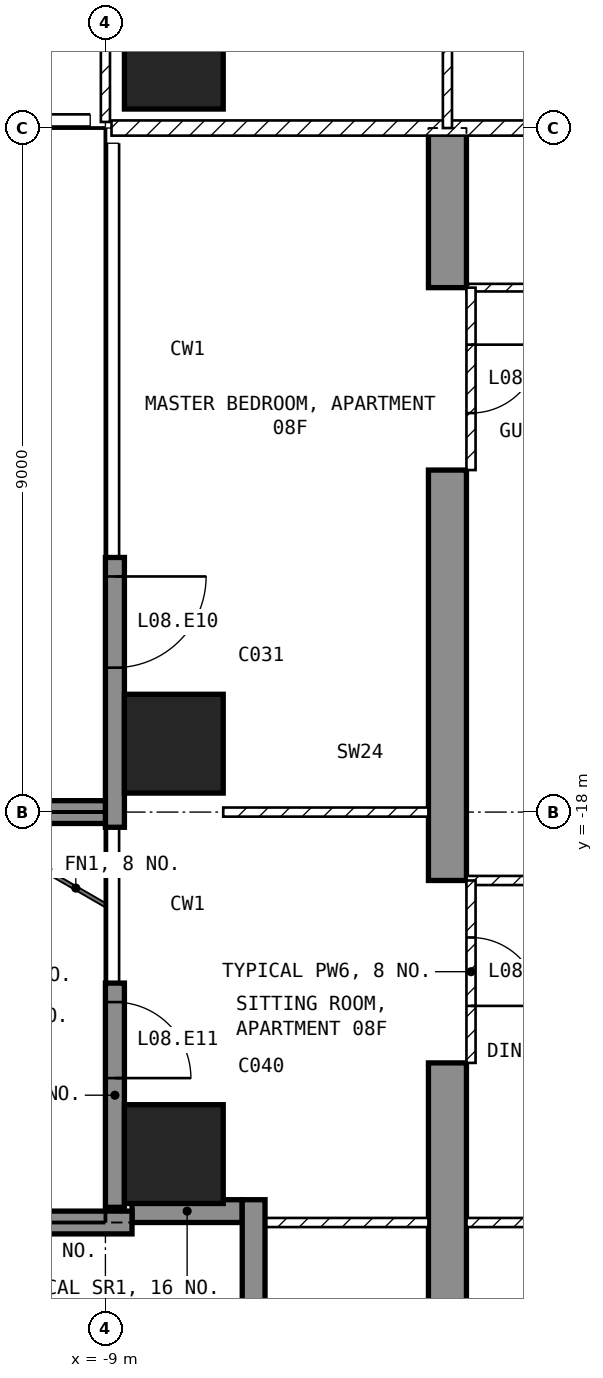
"""IFC4 building model, lengths in metres.
Left out: names, types, materials, properties, quantities, classifications, styles, units other than length and angle.
Written with IfcOpenShell. Run it as: python <this file> out.ifc"""

import sys

from ifc_helpers import new_model, si_unit, direction, frame, frame_2d, origin, origin_2d, place, context, subcontext, project, spatial, polyline, rectangle, outline, extrude, element, fill, save


model = new_model("IFC4")
c1 = context("Model", 3, precision=1e-05, world=origin(), true_north=direction((0.0, 1.0)))
c2 = subcontext(c1, "Body", "Model", "MODEL_VIEW")
j1 = project(units=[si_unit("LENGTHUNIT", "METRE"), si_unit("PLANEANGLEUNIT", "RADIAN")], contexts=[c1])
p1 = place(None, origin())
s1 = spatial("IfcSite", under=j1, at=p1, CompositionType="ELEMENT")
p2 = place(p1, origin())
s2 = spatial("IfcBuilding", under=s1, at=p2, CompositionType="ELEMENT")
p3 = place(p2, frame((0.0, 0.0, 47.0)))
s3 = spatial("IfcBuildingStorey", under=s2, at=p3, CompositionType="ELEMENT", Elevation=47.0)
for number, where, z_axis, x_axis in (
    (1, (-8.1, -22.5, -0.25), (0.0, 0.0, 1.0), (1.0, 0.0, 0.0)),
    (2, (-8.1, -17.1, -0.25), (0.0, 0.0, 1.0), (1.0, 0.0, 0.0)),
    (3, (-8.1, -8.1, -0.25), (0.0, 0.0, 1.0), (1.0, 0.0, 0.0)),
):
    element("IfcColumn", number, at=place(p3, frame(where, z_axis=z_axis, x_axis=x_axis)), inside=s3, PredefinedType="COLUMN", context=c2, shape_type="SweptSolid", body=[
        extrude(rectangle(XDim=1.3, YDim=1.3, at=origin_2d()), origin(), (0.0, 0.0, 1.0), 3.5),
    ])
p4 = place(p3, frame((-4.75, -25.45, -0.25), z_axis=(1.0, 0.0, 0.0), x_axis=(0.0, 1.0, 0.0)))
e4 = element("IfcWall", 4, at=p4, inside=s3, PredefinedType="SHEAR", context=c2, shape_type="SweptSolid", body=[
    extrude(outline(polyline([(0.0, 0.0), (4.15, 0.0), (4.15, 2.65), (6.55, 2.65), (6.55, 0.0), (11.95, 0.0), (11.95, 2.65), (14.35, 2.65), (14.35, 0.0), (16.45, 0.0), (16.45, 3.5), (0.0, 3.5), (0.0, 0.0)])), origin(), (0.0, 0.0, 1.0), 0.5),
])
p5 = place(p3, frame((-8.875, -14.65, 0.0), z_axis=(0.0, 0.0, 1.0), x_axis=(0.0, -1.0, 0.0)))
e5 = element("IfcWall", 5, at=p5, inside=s3, PredefinedType="SOLIDWALL", context=c2, shape_type="SweptSolid", body=[
    extrude(rectangle(XDim=3.55, YDim=0.25, at=frame_2d((1.775, 0.0))), origin(), (0.0, 0.0, 1.0), 3.25),
])
p6 = place(p5, frame((0.25, 0.0, 0.0)))
e6 = element("IfcOpeningElement", 6, at=p6, cuts=e5, PredefinedType="OPENING", context=c2, shape_type="SweptSolid", body=[
    extrude(rectangle(XDim=1.2, YDim=2.4, at=frame_2d((0.6, 1.2))), frame((0.0, 0.135, 0.0), z_axis=(0.0, -1.0, 0.0), x_axis=(1.0, 0.0, 0.0)), (0.0, 0.0, 1.0), 0.27),
])
p7 = place(p3, frame((-8.875, -20.25, 0.0), z_axis=(0.0, 0.0, 1.0), x_axis=(0.0, -1.0, 0.0)))
e7 = element("IfcWall", 7, at=p7, inside=s3, PredefinedType="SOLIDWALL", context=c2, shape_type="SweptSolid", body=[
    extrude(rectangle(XDim=2.95, YDim=0.25, at=frame_2d((1.475, 0.0))), origin(), (0.0, 0.0, 1.0), 3.25),
])
p8 = place(p7, frame((0.25, 0.0, 0.0)))
e8 = element("IfcOpeningElement", 8, at=p8, cuts=e7, PredefinedType="OPENING", context=c2, shape_type="SweptSolid", body=[
    extrude(rectangle(XDim=1.0, YDim=2.4, at=frame_2d((0.5, 1.2))), frame((0.0, 0.135, 0.0), z_axis=(0.0, -1.0, 0.0), x_axis=(1.0, 0.0, 0.0)), (0.0, 0.0, 1.0), 0.27),
])
p9 = place(p3, frame((-8.65, -23.25, 0.0), z_axis=(0.0, 0.0, 1.0), x_axis=(1.0, 0.0, 0.0)))
e9 = element("IfcWall", 9, at=p9, inside=s3, PredefinedType="SOLIDWALL", context=c2, shape_type="SweptSolid", body=[
    extrude(rectangle(XDim=1.45, YDim=0.3, at=frame_2d((0.725, 0.0))), origin(), (0.0, 0.0, 1.0), 3.25),
])
p10 = place(p3, frame((-7.05, -23.1, 0.0), z_axis=(0.0, 0.0, 1.0), x_axis=(0.0, -1.0, 0.0)))
e10 = element("IfcWall", 10, at=p10, inside=s3, PredefinedType="SOLIDWALL", context=c2, shape_type="SweptSolid", body=[
    extrude(rectangle(XDim=1.8, YDim=0.3, at=frame_2d((0.9, 0.0))), origin(), (0.0, 0.0, 1.0), 3.25),
])
p11 = place(p3, frame((-8.65, -23.4, 0.0), z_axis=(0.0, 0.0, 1.0), x_axis=(-1.0, 0.0, 0.0)))
e11 = element("IfcWall", 11, at=p11, inside=s3, PredefinedType="SOLIDWALL", context=c2, shape_type="SweptSolid", body=[
    extrude(rectangle(XDim=3.05, YDim=0.3, at=frame_2d((1.525, 0.0))), origin(), (0.0, 0.0, 1.0), 3.25),
])
p12 = place(p3, frame((-9.0, -18.0, 0.0), z_axis=(0.0, 0.0, 1.0), x_axis=(-1.0, 0.0, 0.0)))
e12 = element("IfcWall", 12, at=p12, inside=s3, PredefinedType="SOLIDWALL", context=c2, shape_type="SweptSolid", body=[
    extrude(rectangle(XDim=2.7, YDim=0.3, at=frame_2d((1.35, 0.0))), origin(), (0.0, 0.0, 1.0), 3.25),
])
p13 = place(p3, frame((8.92, -9.0, 0.0), z_axis=(0.0, 0.0, 1.0), x_axis=(-1.0, 0.0, 0.0)))
e13 = element("IfcWall", 13, at=p13, inside=s3, PredefinedType="PARTITIONING", context=c2, shape_type="SweptSolid", body=[
    extrude(rectangle(XDim=17.84, YDim=0.2, at=frame_2d((8.92, 0.0))), origin(), (0.0, 0.0, 1.0), 3.25),
])
p14 = place(p13, frame((8.42, 0.0, 0.0)))
e14 = element("IfcOpeningElement", 14, at=p14, cuts=e13, PredefinedType="OPENING", context=c2, shape_type="SweptSolid", body=[
    extrude(rectangle(XDim=1.0, YDim=2.1, at=frame_2d((0.5, 1.05))), frame((0.0, 0.11, 0.0), z_axis=(0.0, -1.0, 0.0), x_axis=(1.0, 0.0, 0.0)), (0.0, 0.0, 1.0), 0.22),
])
p15 = place(p3, frame((-9.0, -4.56, 0.0), z_axis=(0.0, 0.0, 1.0), x_axis=(0.0, -1.0, 0.0)))
e15 = element("IfcWall", 15, at=p15, inside=s3, PredefinedType="PARTITIONING", context=c2, shape_type="SweptSolid", body=[
    extrude(rectangle(XDim=4.36, YDim=0.12, at=frame_2d((2.18, 0.0))), origin(), (0.0, 0.0, 1.0), 3.25),
])
p16 = place(p15, frame((0.77, 0.0, 0.0)))
e16 = element("IfcOpeningElement", 16, at=p16, cuts=e15, PredefinedType="OPENING", context=c2, shape_type="SweptSolid", body=[
    extrude(rectangle(XDim=0.9, YDim=2.1, at=frame_2d((0.45, 1.05))), frame((0.0, 0.07, 0.0), z_axis=(0.0, -1.0, 0.0), x_axis=(1.0, 0.0, 0.0)), (0.0, 0.0, 1.0), 0.14),
])
p17 = place(p3, frame((-4.5, -1.3, 0.0), z_axis=(0.0, 0.0, 1.0), x_axis=(0.0, -1.0, 0.0)))
e17 = element("IfcWall", 17, at=p17, inside=s3, PredefinedType="PARTITIONING", context=c2, shape_type="SweptSolid", body=[
    extrude(rectangle(XDim=7.7, YDim=0.12, at=frame_2d((3.85, 0.0))), origin(), (0.0, 0.0, 1.0), 3.25),
])
p18 = place(p17, frame((4.988, 0.0, 0.0)))
e18 = element("IfcOpeningElement", 18, at=p18, cuts=e17, PredefinedType="OPENING", context=c2, shape_type="SweptSolid", body=[
    extrude(rectangle(XDim=0.9, YDim=2.1, at=frame_2d((0.45, 1.05))), frame((0.0, 0.07, 0.0), z_axis=(0.0, -1.0, 0.0), x_axis=(1.0, 0.0, 0.0)), (0.0, 0.0, 1.0), 0.14),
])
p19 = place(p3, frame((-2.1, -11.1, 0.0), z_axis=(0.0, 0.0, 1.0), x_axis=(-1.0, 0.0, 0.0)))
e19 = element("IfcWall", 19, at=p19, inside=s3, PredefinedType="PARTITIONING", context=c2, shape_type="SweptSolid", body=[
    extrude(rectangle(XDim=2.15, YDim=0.1, at=frame_2d((1.075, 0.0))), origin(), (0.0, 0.0, 1.0), 3.25),
])
p20 = place(p3, frame((4.25, -18.9, 0.0), z_axis=(0.0, 0.0, 1.0), x_axis=(-1.0, 0.0, 0.0)))
e20 = element("IfcWall", 20, at=p20, inside=s3, PredefinedType="PARTITIONING", context=c2, shape_type="SweptSolid", body=[
    extrude(rectangle(XDim=8.5, YDim=0.12, at=frame_2d((4.25, 0.0))), origin(), (0.0, 0.0, 1.0), 3.25),
])
p21 = place(p20, frame((5.675, 0.0, 0.0)))
e21 = element("IfcOpeningElement", 21, at=p21, cuts=e20, PredefinedType="OPENING", context=c2, shape_type="SweptSolid", body=[
    extrude(rectangle(XDim=0.9, YDim=2.1, at=frame_2d((0.45, 1.05))), frame((0.0, 0.07, 0.0), z_axis=(0.0, -1.0, 0.0), x_axis=(1.0, 0.0, 0.0)), (0.0, 0.0, 1.0), 0.14),
])
p22 = place(p3, frame((4.25, -23.4, 0.0), z_axis=(0.0, 0.0, 1.0), x_axis=(-1.0, 0.0, 0.0)))
e22 = element("IfcWall", 22, at=p22, inside=s3, PredefinedType="PARTITIONING", context=c2, shape_type="SweptSolid", body=[
    extrude(rectangle(XDim=8.5, YDim=0.12, at=frame_2d((4.25, 0.0))), origin(), (0.0, 0.0, 1.0), 3.25),
])
p23 = place(p22, frame((5.675, 0.0, 0.0)))
e23 = element("IfcOpeningElement", 23, at=p23, cuts=e22, PredefinedType="OPENING", context=c2, shape_type="SweptSolid", body=[
    extrude(rectangle(XDim=0.9, YDim=2.1, at=frame_2d((0.45, 1.05))), frame((0.0, 0.07, 0.0), z_axis=(0.0, -1.0, 0.0), x_axis=(1.0, 0.0, 0.0)), (0.0, 0.0, 1.0), 0.14),
])
p24 = place(p3, frame((-4.75, -18.0, 0.0), z_axis=(0.0, 0.0, 1.0), x_axis=(-1.0, 0.0, 0.0)))
e24 = element("IfcWall", 24, at=p24, inside=s3, PredefinedType="PARTITIONING", context=c2, shape_type="SweptSolid", body=[
    extrude(rectangle(XDim=2.7, YDim=0.12, at=frame_2d((1.35, 0.0))), origin(), (0.0, 0.0, 1.0), 3.25),
])
p25 = place(p3, frame((-4.75, -23.4, 0.0), z_axis=(0.0, 0.0, 1.0), x_axis=(-1.0, 0.0, 0.0)))
e25 = element("IfcWall", 25, at=p25, inside=s3, PredefinedType="PARTITIONING", context=c2, shape_type="SweptSolid", body=[
    extrude(rectangle(XDim=2.37, YDim=0.12, at=frame_2d((1.185, 0.0))), origin(), (0.0, 0.0, 1.0), 3.25),
])
p26 = place(p3, frame((-4.19, -11.1, 0.0), z_axis=(0.0, 0.0, 1.0), x_axis=(0.0, -1.0, 0.0)))
e26 = element("IfcWall", 26, at=p26, inside=s3, PredefinedType="PARTITIONING", context=c2, shape_type="SweptSolid", body=[
    extrude(rectangle(XDim=2.4, YDim=0.12, at=frame_2d((1.2, 0.0))), origin(), (0.0, 0.0, 1.0), 2.4),
])
p27 = place(p26, frame((0.75, 0.0, 0.0)))
e27 = element("IfcOpeningElement", 27, at=p27, cuts=e26, PredefinedType="OPENING", context=c2, shape_type="SweptSolid", body=[
    extrude(rectangle(XDim=0.9, YDim=2.1, at=frame_2d((0.45, 1.05))), frame((0.0, 0.07, 0.0), z_axis=(0.0, -1.0, 0.0), x_axis=(1.0, 0.0, 0.0)), (0.0, 0.0, 1.0), 0.14),
])
p28 = place(p3, frame((-4.19, -18.9, 0.0), z_axis=(0.0, 0.0, 1.0), x_axis=(0.0, -1.0, 0.0)))
e28 = element("IfcWall", 28, at=p28, inside=s3, PredefinedType="PARTITIONING", context=c2, shape_type="SweptSolid", body=[
    extrude(rectangle(XDim=2.4, YDim=0.12, at=frame_2d((1.2, 0.0))), origin(), (0.0, 0.0, 1.0), 2.4),
])
p29 = place(p28, frame((0.75, 0.0, 0.0)))
e29 = element("IfcOpeningElement", 29, at=p29, cuts=e28, PredefinedType="OPENING", context=c2, shape_type="SweptSolid", body=[
    extrude(rectangle(XDim=0.9, YDim=2.1, at=frame_2d((0.45, 1.05))), frame((0.0, 0.07, 0.0), z_axis=(0.0, -1.0, 0.0), x_axis=(1.0, 0.0, 0.0)), (0.0, 0.0, 1.0), 0.14),
])
p30 = place(p6, origin())
e30 = element("IfcDoor", 30, at=p30, inside=s3, OperationType="SINGLE_SWING_LEFT", PredefinedType="DOOR", context=c2, shape_type="SweptSolid", body=[
    extrude(rectangle(XDim=1.2, YDim=2.4, at=frame_2d((0.6, 1.2))), frame((0.0, 0.025, 0.0), z_axis=(0.0, -1.0, 0.0), x_axis=(1.0, 0.0, 0.0)), (0.0, 0.0, 1.0), 0.05),
])
fill(e6, e30)
p31 = place(p8, origin())
e31 = element("IfcDoor", 31, at=p31, inside=s3, OperationType="SINGLE_SWING_RIGHT", PredefinedType="DOOR", context=c2, shape_type="SweptSolid", body=[
    extrude(rectangle(XDim=1.0, YDim=2.4, at=frame_2d((0.5, 1.2))), frame((0.0, 0.025, 0.0), z_axis=(0.0, -1.0, 0.0), x_axis=(1.0, 0.0, 0.0)), (0.0, 0.0, 1.0), 0.05),
])
fill(e8, e31)
p32 = place(p27, origin())
e32 = element("IfcDoor", 32, at=p32, inside=s3, OperationType="SINGLE_SWING_LEFT", PredefinedType="DOOR", context=c2, shape_type="SweptSolid", body=[
    extrude(rectangle(XDim=0.9, YDim=2.1, at=frame_2d((0.45, 1.05))), frame((0.0, 0.025, 0.0), z_axis=(0.0, -1.0, 0.0), x_axis=(1.0, 0.0, 0.0)), (0.0, 0.0, 1.0), 0.05),
])
fill(e27, e32)
p33 = place(p29, origin())
e33 = element("IfcDoor", 33, at=p33, inside=s3, OperationType="SINGLE_SWING_RIGHT", PredefinedType="DOOR", context=c2, shape_type="SweptSolid", body=[
    extrude(rectangle(XDim=0.9, YDim=2.1, at=frame_2d((0.45, 1.05))), frame((0.0, 0.025, 0.0), z_axis=(0.0, -1.0, 0.0), x_axis=(1.0, 0.0, 0.0)), (0.0, 0.0, 1.0), 0.05),
])
fill(e29, e33)
save(model, sys.argv[1])
